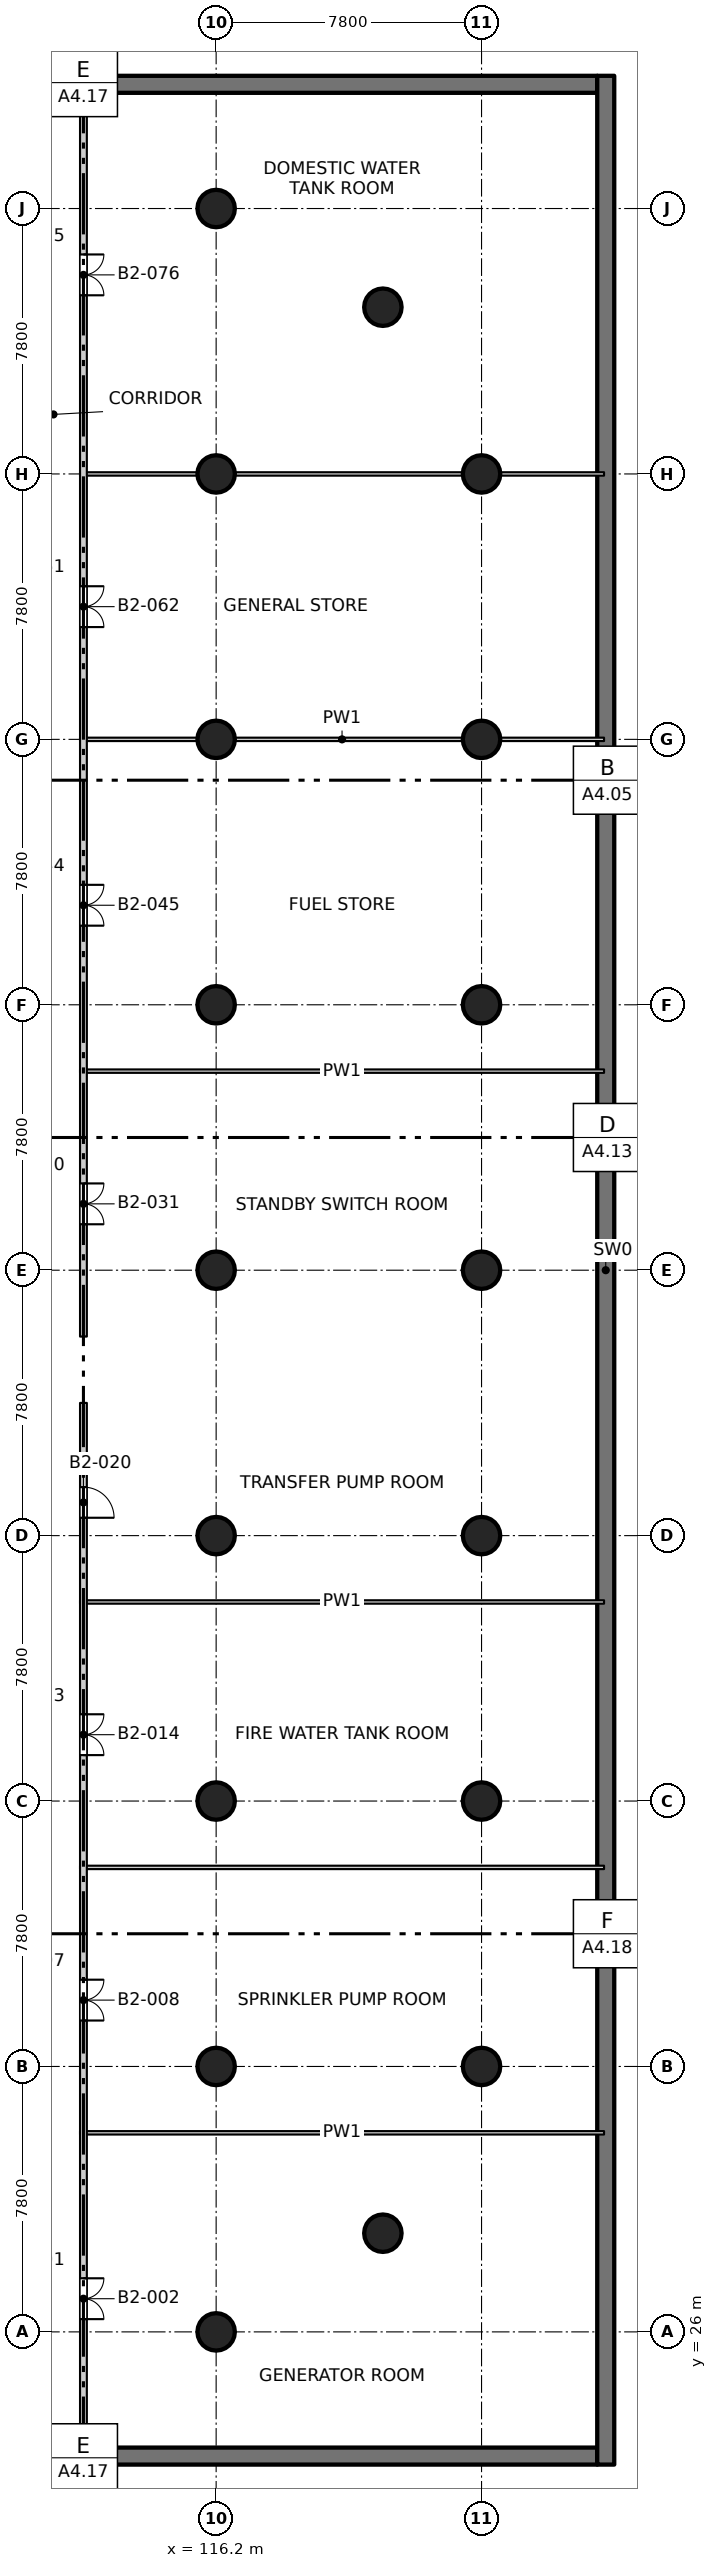
"""IFC4 building model, lengths in metres.
Left out: names, types, materials, properties, quantities, classifications, styles, units other than length and angle.
Written with IfcOpenShell. Run it as: python <this file> out.ifc"""

import sys

from ifc_helpers import new_model, si_unit, direction, frame, frame_2d, origin, origin_2d, place, context, subcontext, project, spatial, rectangle, circle, extrude, element, fill, save


model = new_model("IFC4")
c1 = context("Model", 3, precision=1e-05, world=origin(), true_north=direction((0.0, 1.0)))
c2 = subcontext(c1, "Body", "Model", "MODEL_VIEW")
j1 = project(units=[si_unit("LENGTHUNIT", "METRE"), si_unit("PLANEANGLEUNIT", "RADIAN")], contexts=[c1])
p1 = place(None, origin())
s1 = spatial("IfcSite", under=j1, at=p1, CompositionType="ELEMENT")
p2 = place(p1, origin())
s2 = spatial("IfcBuilding", under=s1, at=p2, CompositionType="ELEMENT")
p3 = place(p2, frame((0.0, 0.0, -9.0)))
s3 = spatial("IfcBuildingStorey", under=s2, at=p3, CompositionType="ELEMENT", Elevation=-9.0)
for number, where, z_axis, x_axis in (
    (1, (42.6, 22.35, -0.5), (0.0, 0.0, 1.0), (1.0, 0.0, 0.0)),
    (2, (42.6, 92.05, -0.5), (0.0, 0.0, 1.0), (1.0, 0.0, 0.0)),
):
    element("IfcWall", number, at=place(p3, frame(where, z_axis=z_axis, x_axis=x_axis)), inside=s3, PredefinedType="SOLIDWALL", context=c2, shape_type="SweptSolid", body=[
        extrude(rectangle(XDim=84.8, YDim=0.5, at=frame_2d((42.4, 0.0))), origin(), (0.0, 0.0, 1.0), 4.65),
    ])
p4 = place(p3, frame((127.65, 22.1, -0.5), z_axis=(0.0, 0.0, 1.0), x_axis=(0.0, 1.0, 0.0)))
e3 = element("IfcWall", 3, at=p4, inside=s3, PredefinedType="SOLIDWALL", context=c2, shape_type="SweptSolid", body=[
    extrude(rectangle(XDim=70.2, YDim=0.5, at=frame_2d((35.1, 0.0))), origin(), (0.0, 0.0, 1.0), 4.65),
])
for number, where, z_axis, x_axis in (
    (4, (116.2, 26.0, -0.5), (0.0, 0.0, 1.0), (1.0, 0.0, 0.0)),
    (5, (116.2, 33.8, -0.5), (0.0, 0.0, 1.0), (1.0, 0.0, 0.0)),
    (6, (116.2, 41.6, -0.5), (0.0, 0.0, 1.0), (1.0, 0.0, 0.0)),
    (7, (116.2, 49.4, -0.5), (0.0, 0.0, 1.0), (1.0, 0.0, 0.0)),
    (8, (116.2, 57.2, -0.5), (0.0, 0.0, 1.0), (1.0, 0.0, 0.0)),
    (9, (116.2, 65.0, -0.5), (0.0, 0.0, 1.0), (1.0, 0.0, 0.0)),
    (10, (116.2, 72.8, -0.5), (0.0, 0.0, 1.0), (1.0, 0.0, 0.0)),
    (11, (116.2, 80.6, -0.5), (0.0, 0.0, 1.0), (1.0, 0.0, 0.0)),
    (12, (116.2, 88.4, -0.5), (0.0, 0.0, 1.0), (1.0, 0.0, 0.0)),
    (13, (121.1, 28.9, -0.5), (0.0, 0.0, 1.0), (1.0, 0.0, 0.0)),
    (14, (124.0, 33.8, -0.5), (0.0, 0.0, 1.0), (1.0, 0.0, 0.0)),
    (15, (124.0, 41.6, -0.5), (0.0, 0.0, 1.0), (1.0, 0.0, 0.0)),
    (16, (124.0, 49.4, -0.5), (0.0, 0.0, 1.0), (1.0, 0.0, 0.0)),
    (17, (124.0, 57.2, -0.5), (0.0, 0.0, 1.0), (1.0, 0.0, 0.0)),
    (18, (124.0, 65.0, -0.5), (0.0, 0.0, 1.0), (1.0, 0.0, 0.0)),
    (19, (124.0, 72.8, -0.5), (0.0, 0.0, 1.0), (1.0, 0.0, 0.0)),
    (20, (124.0, 80.6, -0.5), (0.0, 0.0, 1.0), (1.0, 0.0, 0.0)),
    (21, (121.1, 85.5, -0.5), (0.0, 0.0, 1.0), (1.0, 0.0, 0.0)),
):
    element("IfcColumn", number, at=place(p3, frame(where, z_axis=z_axis, x_axis=x_axis)), inside=s3, PredefinedType="COLUMN", context=c2, shape_type="SweptSolid", body=[
        extrude(circle(Radius=0.55, at=origin_2d()), origin(), (0.0, 0.0, 1.0), 4.65),
    ])
for number, where, z_axis, x_axis in (
    (22, (112.2, 31.85, 0.0), (0.0, 0.0, 1.0), (1.0, 0.0, 0.0)),
    (23, (112.2, 39.65, 0.0), (0.0, 0.0, 1.0), (1.0, 0.0, 0.0)),
    (24, (112.2, 47.45, 0.0), (0.0, 0.0, 1.0), (1.0, 0.0, 0.0)),
    (25, (112.2, 63.05, 0.0), (0.0, 0.0, 1.0), (1.0, 0.0, 0.0)),
    (26, (112.2, 72.8, 0.0), (0.0, 0.0, 1.0), (1.0, 0.0, 0.0)),
    (27, (112.2, 80.6, 0.0), (0.0, 0.0, 1.0), (1.0, 0.0, 0.0)),
):
    element("IfcWall", number, at=place(p3, frame(where, z_axis=z_axis, x_axis=x_axis)), inside=s3, PredefinedType="PARTITIONING", context=c2, shape_type="SweptSolid", body=[
        extrude(rectangle(XDim=15.4, YDim=0.1, at=frame_2d((7.7, 0.0))), origin(), (0.0, 0.0, 1.0), 4.15),
    ])
p5 = place(p3, frame((112.3, 22.4, 0.0), z_axis=(0.0, 0.0, 1.0), x_axis=(0.0, 1.0, 0.0)))
e28 = element("IfcWall", 28, at=p5, inside=s3, PredefinedType="PARTITIONING", context=c2, shape_type="SweptSolid", body=[
    extrude(rectangle(XDim=30.9, YDim=0.2, at=frame_2d((15.45, 0.0))), origin(), (0.0, 0.0, 1.0), 4.15),
])
p6 = place(p5, frame((3.975, 0.0, 0.0)))
e29 = element("IfcOpeningElement", 29, at=p6, cuts=e28, PredefinedType="OPENING", context=c2, shape_type="SweptSolid", body=[
    extrude(rectangle(XDim=1.2, YDim=2.1, at=frame_2d((0.6, 1.05))), frame((0.0, 0.11, 0.0), z_axis=(0.0, -1.0, 0.0), x_axis=(1.0, 0.0, 0.0)), (0.0, 0.0, 1.0), 0.22),
])
p7 = place(p5, frame((12.75, 0.0, 0.0)))
e30 = element("IfcOpeningElement", 30, at=p7, cuts=e28, PredefinedType="OPENING", context=c2, shape_type="SweptSolid", body=[
    extrude(rectangle(XDim=1.2, YDim=2.1, at=frame_2d((0.6, 1.05))), frame((0.0, 0.11, 0.0), z_axis=(0.0, -1.0, 0.0), x_axis=(1.0, 0.0, 0.0)), (0.0, 0.0, 1.0), 0.22),
])
p8 = place(p5, frame((20.55, 0.0, 0.0)))
e31 = element("IfcOpeningElement", 31, at=p8, cuts=e28, PredefinedType="OPENING", context=c2, shape_type="SweptSolid", body=[
    extrude(rectangle(XDim=1.2, YDim=2.1, at=frame_2d((0.6, 1.05))), frame((0.0, 0.11, 0.0), z_axis=(0.0, -1.0, 0.0), x_axis=(1.0, 0.0, 0.0)), (0.0, 0.0, 1.0), 0.22),
])
p9 = place(p5, frame((27.525, 0.0, 0.0)))
e32 = element("IfcOpeningElement", 32, at=p9, cuts=e28, PredefinedType="OPENING", context=c2, shape_type="SweptSolid", body=[
    extrude(rectangle(XDim=0.9, YDim=2.1, at=frame_2d((0.45, 1.05))), frame((0.0, 0.11, 0.0), z_axis=(0.0, -1.0, 0.0), x_axis=(1.0, 0.0, 0.0)), (0.0, 0.0, 1.0), 0.22),
])
p10 = place(p3, frame((112.3, 55.25, 0.0), z_axis=(0.0, 0.0, 1.0), x_axis=(0.0, 1.0, 0.0)))
e33 = element("IfcWall", 33, at=p10, inside=s3, PredefinedType="PARTITIONING", context=c2, shape_type="SweptSolid", body=[
    extrude(rectangle(XDim=36.75, YDim=0.2, at=frame_2d((18.375, 0.0))), origin(), (0.0, 0.0, 1.0), 4.15),
])
p11 = place(p10, frame((3.3, 0.0, 0.0)))
e34 = element("IfcOpeningElement", 34, at=p11, cuts=e33, PredefinedType="OPENING", context=c2, shape_type="SweptSolid", body=[
    extrude(rectangle(XDim=1.2, YDim=2.1, at=frame_2d((0.6, 1.05))), frame((0.0, 0.11, 0.0), z_axis=(0.0, -1.0, 0.0), x_axis=(1.0, 0.0, 0.0)), (0.0, 0.0, 1.0), 0.22),
])
p12 = place(p10, frame((12.075, 0.0, 0.0)))
e35 = element("IfcOpeningElement", 35, at=p12, cuts=e33, PredefinedType="OPENING", context=c2, shape_type="SweptSolid", body=[
    extrude(rectangle(XDim=1.2, YDim=2.1, at=frame_2d((0.6, 1.05))), frame((0.0, 0.11, 0.0), z_axis=(0.0, -1.0, 0.0), x_axis=(1.0, 0.0, 0.0)), (0.0, 0.0, 1.0), 0.22),
])
p13 = place(p10, frame((20.85, 0.0, 0.0)))
e36 = element("IfcOpeningElement", 36, at=p13, cuts=e33, PredefinedType="OPENING", context=c2, shape_type="SweptSolid", body=[
    extrude(rectangle(XDim=1.2, YDim=2.1, at=frame_2d((0.6, 1.05))), frame((0.0, 0.11, 0.0), z_axis=(0.0, -1.0, 0.0), x_axis=(1.0, 0.0, 0.0)), (0.0, 0.0, 1.0), 0.22),
])
p14 = place(p10, frame((30.6, 0.0, 0.0)))
e37 = element("IfcOpeningElement", 37, at=p14, cuts=e33, PredefinedType="OPENING", context=c2, shape_type="SweptSolid", body=[
    extrude(rectangle(XDim=1.2, YDim=2.1, at=frame_2d((0.6, 1.05))), frame((0.0, 0.11, 0.0), z_axis=(0.0, -1.0, 0.0), x_axis=(1.0, 0.0, 0.0)), (0.0, 0.0, 1.0), 0.22),
])
p15 = place(p6, origin())
e38 = element("IfcDoor", 38, at=p15, inside=s3, OperationType="DOUBLE_DOOR_SINGLE_SWING", PredefinedType="DOOR", context=c2, shape_type="SweptSolid", body=[
    extrude(rectangle(XDim=1.2, YDim=2.1, at=frame_2d((0.6, 1.05))), frame((0.0, 0.025, 0.0), z_axis=(0.0, -1.0, 0.0), x_axis=(1.0, 0.0, 0.0)), (0.0, 0.0, 1.0), 0.05),
])
fill(e29, e38)
p16 = place(p7, origin())
e39 = element("IfcDoor", 39, at=p16, inside=s3, OperationType="DOUBLE_DOOR_SINGLE_SWING", PredefinedType="DOOR", context=c2, shape_type="SweptSolid", body=[
    extrude(rectangle(XDim=1.2, YDim=2.1, at=frame_2d((0.6, 1.05))), frame((0.0, 0.025, 0.0), z_axis=(0.0, -1.0, 0.0), x_axis=(1.0, 0.0, 0.0)), (0.0, 0.0, 1.0), 0.05),
])
fill(e30, e39)
p17 = place(p8, origin())
e40 = element("IfcDoor", 40, at=p17, inside=s3, OperationType="DOUBLE_DOOR_SINGLE_SWING", PredefinedType="DOOR", context=c2, shape_type="SweptSolid", body=[
    extrude(rectangle(XDim=1.2, YDim=2.1, at=frame_2d((0.6, 1.05))), frame((0.0, 0.025, 0.0), z_axis=(0.0, -1.0, 0.0), x_axis=(1.0, 0.0, 0.0)), (0.0, 0.0, 1.0), 0.05),
])
fill(e31, e40)
p18 = place(p9, origin())
e41 = element("IfcDoor", 41, at=p18, inside=s3, OperationType="SINGLE_SWING_RIGHT", PredefinedType="DOOR", context=c2, shape_type="SweptSolid", body=[
    extrude(rectangle(XDim=0.9, YDim=2.1, at=frame_2d((0.45, 1.05))), frame((0.0, 0.025, 0.0), z_axis=(0.0, -1.0, 0.0), x_axis=(1.0, 0.0, 0.0)), (0.0, 0.0, 1.0), 0.05),
])
fill(e32, e41)
p19 = place(p11, origin())
e42 = element("IfcDoor", 42, at=p19, inside=s3, OperationType="DOUBLE_DOOR_SINGLE_SWING", PredefinedType="DOOR", context=c2, shape_type="SweptSolid", body=[
    extrude(rectangle(XDim=1.2, YDim=2.1, at=frame_2d((0.6, 1.05))), frame((0.0, 0.025, 0.0), z_axis=(0.0, -1.0, 0.0), x_axis=(1.0, 0.0, 0.0)), (0.0, 0.0, 1.0), 0.05),
])
fill(e34, e42)
p20 = place(p12, origin())
e43 = element("IfcDoor", 43, at=p20, inside=s3, OperationType="DOUBLE_DOOR_SINGLE_SWING", PredefinedType="DOOR", context=c2, shape_type="SweptSolid", body=[
    extrude(rectangle(XDim=1.2, YDim=2.1, at=frame_2d((0.6, 1.05))), frame((0.0, 0.025, 0.0), z_axis=(0.0, -1.0, 0.0), x_axis=(1.0, 0.0, 0.0)), (0.0, 0.0, 1.0), 0.05),
])
fill(e35, e43)
p21 = place(p13, origin())
e44 = element("IfcDoor", 44, at=p21, inside=s3, OperationType="DOUBLE_DOOR_SINGLE_SWING", PredefinedType="DOOR", context=c2, shape_type="SweptSolid", body=[
    extrude(rectangle(XDim=1.2, YDim=2.1, at=frame_2d((0.6, 1.05))), frame((0.0, 0.025, 0.0), z_axis=(0.0, -1.0, 0.0), x_axis=(1.0, 0.0, 0.0)), (0.0, 0.0, 1.0), 0.05),
])
fill(e36, e44)
p22 = place(p14, origin())
e45 = element("IfcDoor", 45, at=p22, inside=s3, OperationType="DOUBLE_DOOR_SINGLE_SWING", PredefinedType="DOOR", context=c2, shape_type="SweptSolid", body=[
    extrude(rectangle(XDim=1.2, YDim=2.1, at=frame_2d((0.6, 1.05))), frame((0.0, 0.025, 0.0), z_axis=(0.0, -1.0, 0.0), x_axis=(1.0, 0.0, 0.0)), (0.0, 0.0, 1.0), 0.05),
])
fill(e37, e45)
save(model, sys.argv[1])
